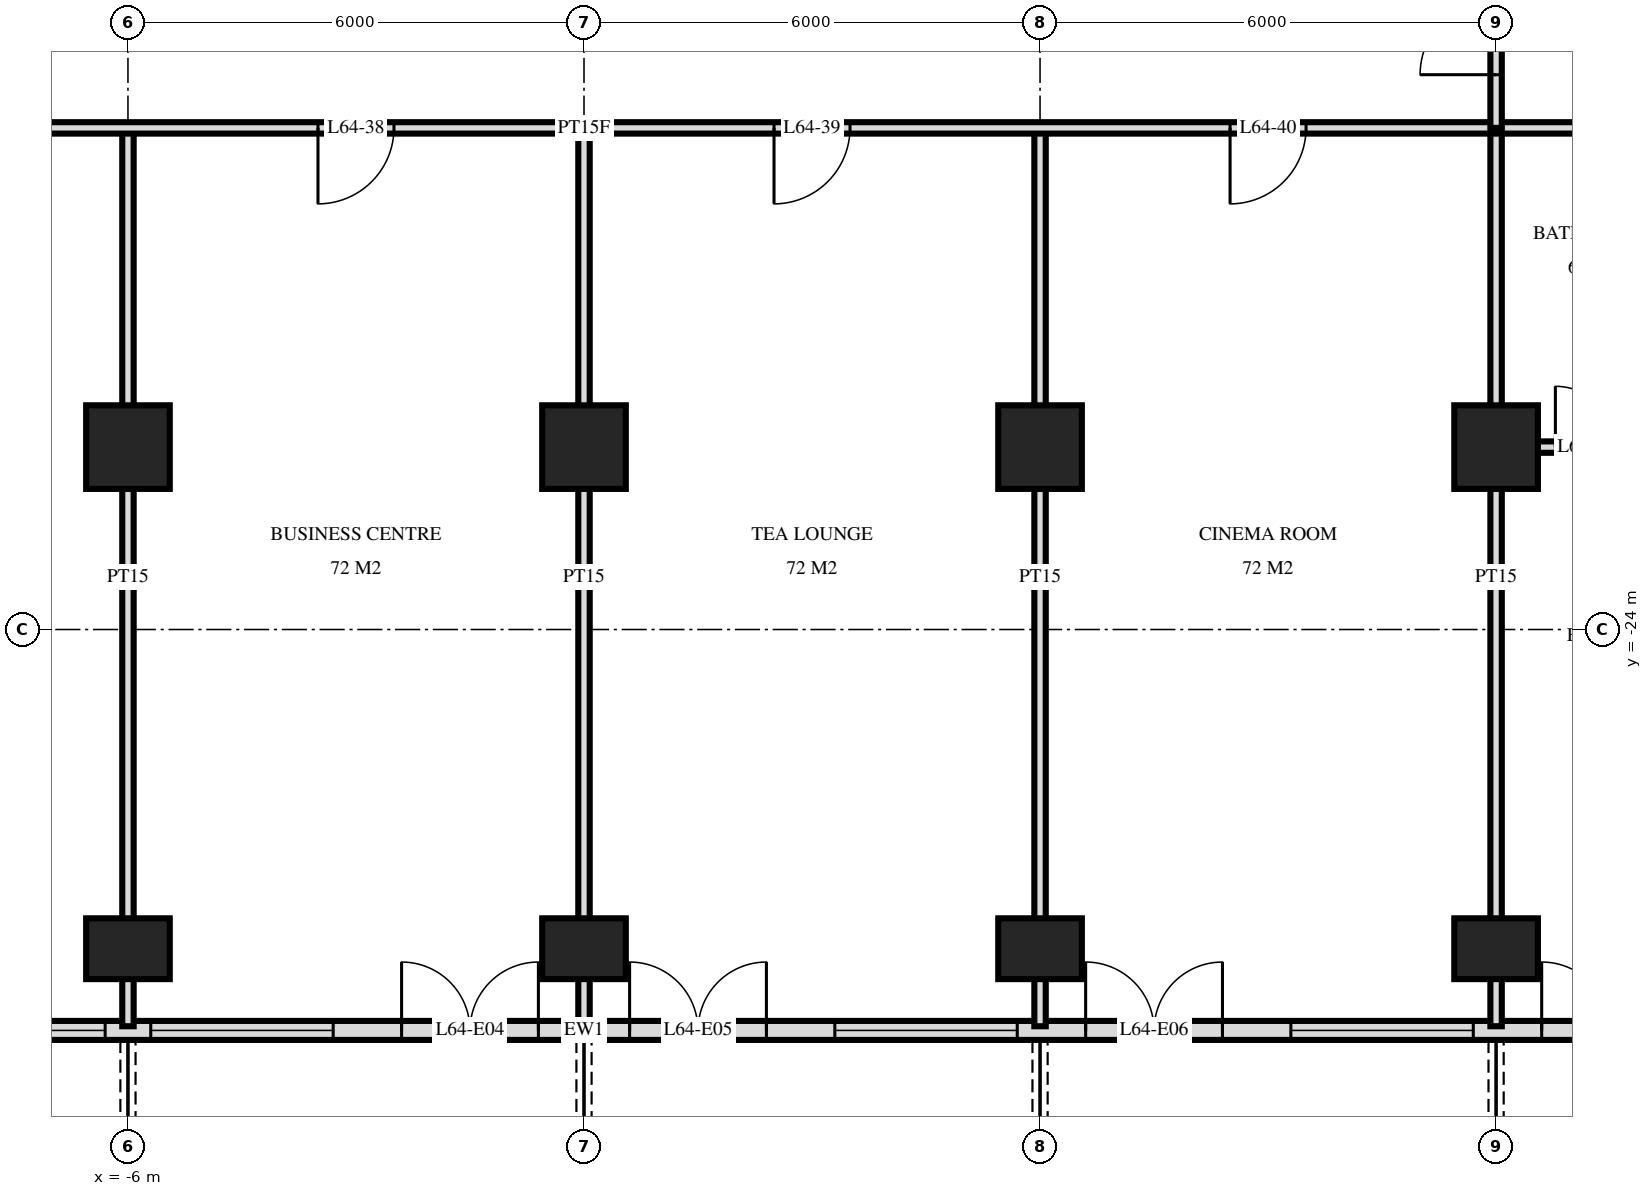
"""IFC4 building model, lengths in metres.
Left out: names, types, materials, properties, quantities, classifications, styles, units other than length and angle.
Written with IfcOpenShell. Run it as: python <this file> out.ifc"""

import sys

from ifc_helpers import new_model, si_unit, direction, frame, frame_2d, origin, origin_2d, place, context, subcontext, project, spatial, rectangle, extrude, element, fill, save


model = new_model("IFC4")
c1 = context("Model", 3, precision=1e-05, world=origin(), true_north=direction((0.0, 1.0)))
c2 = subcontext(c1, "Body", "Model", "MODEL_VIEW")
j1 = project(units=[si_unit("LENGTHUNIT", "METRE"), si_unit("PLANEANGLEUNIT", "RADIAN")], contexts=[c1])
p1 = place(None, origin())
s1 = spatial("IfcSite", under=j1, at=p1, CompositionType="ELEMENT")
p2 = place(p1, origin())
s2 = spatial("IfcBuilding", under=s1, at=p2, CompositionType="ELEMENT")
p3 = place(p2, frame((0.0, 0.0, 243.1)))
s3 = spatial("IfcBuildingStorey", under=s2, at=p3, CompositionType="ELEMENT", Elevation=243.1)
p4 = place(p3, frame((-6.0, -28.2, 0.0), z_axis=(0.0, 0.0, 1.0), x_axis=(1.0, 0.0, 0.0)))
e1 = element("IfcColumn", 1, at=p4, inside=s3, PredefinedType="COLUMN", context=c2, shape_type="SweptSolid", body=[
    extrude(rectangle(XDim=1.1, YDim=0.8, at=origin_2d()), origin(), (0.0, 0.0, 1.0), 3.5),
])
p5 = place(p3, frame((-6.0, -21.6, 0.0), z_axis=(0.0, 0.0, 1.0), x_axis=(1.0, 0.0, 0.0)))
e2 = element("IfcColumn", 2, at=p5, inside=s3, PredefinedType="COLUMN", context=c2, shape_type="SweptSolid", body=[
    extrude(rectangle(XDim=1.1, YDim=1.1, at=origin_2d()), origin(), (0.0, 0.0, 1.0), 3.5),
])
p6 = place(p3, frame((0.0, -28.2, 0.0), z_axis=(0.0, 0.0, 1.0), x_axis=(1.0, 0.0, 0.0)))
e3 = element("IfcColumn", 3, at=p6, inside=s3, PredefinedType="COLUMN", context=c2, shape_type="SweptSolid", body=[
    extrude(rectangle(XDim=1.1, YDim=0.8, at=origin_2d()), origin(), (0.0, 0.0, 1.0), 3.5),
])
p7 = place(p3, frame((0.0, -21.6, 0.0), z_axis=(0.0, 0.0, 1.0), x_axis=(1.0, 0.0, 0.0)))
e4 = element("IfcColumn", 4, at=p7, inside=s3, PredefinedType="COLUMN", context=c2, shape_type="SweptSolid", body=[
    extrude(rectangle(XDim=1.1, YDim=1.1, at=origin_2d()), origin(), (0.0, 0.0, 1.0), 3.5),
])
p8 = place(p3, frame((6.0, -28.2, 0.0), z_axis=(0.0, 0.0, 1.0), x_axis=(1.0, 0.0, 0.0)))
e5 = element("IfcColumn", 5, at=p8, inside=s3, PredefinedType="COLUMN", context=c2, shape_type="SweptSolid", body=[
    extrude(rectangle(XDim=1.1, YDim=0.8, at=origin_2d()), origin(), (0.0, 0.0, 1.0), 3.5),
])
p9 = place(p3, frame((6.0, -21.6, 0.0), z_axis=(0.0, 0.0, 1.0), x_axis=(1.0, 0.0, 0.0)))
e6 = element("IfcColumn", 6, at=p9, inside=s3, PredefinedType="COLUMN", context=c2, shape_type="SweptSolid", body=[
    extrude(rectangle(XDim=1.1, YDim=1.1, at=origin_2d()), origin(), (0.0, 0.0, 1.0), 3.5),
])
p10 = place(p3, frame((12.0, -28.2, 0.0), z_axis=(0.0, 0.0, 1.0), x_axis=(1.0, 0.0, 0.0)))
e7 = element("IfcColumn", 7, at=p10, inside=s3, PredefinedType="COLUMN", context=c2, shape_type="SweptSolid", body=[
    extrude(rectangle(XDim=1.1, YDim=0.8, at=origin_2d()), origin(), (0.0, 0.0, 1.0), 3.5),
])
p11 = place(p3, frame((12.0, -21.6, 0.0), z_axis=(0.0, 0.0, 1.0), x_axis=(1.0, 0.0, 0.0)))
e8 = element("IfcColumn", 8, at=p11, inside=s3, PredefinedType="COLUMN", context=c2, shape_type="SweptSolid", body=[
    extrude(rectangle(XDim=1.1, YDim=1.1, at=origin_2d()), origin(), (0.0, 0.0, 1.0), 3.5),
])
p12 = place(p3, frame((-22.475, -29.275, 0.0), z_axis=(0.0, 0.0, 1.0), x_axis=(1.0, 0.0, 0.0)))
e9 = element("IfcWall", 9, at=p12, inside=s3, PredefinedType="SOLIDWALL", context=c2, shape_type="SweptSolid", body=[
    extrude(rectangle(XDim=44.951, YDim=0.25, at=frame_2d((22.475, 0.0))), origin(), (0.0, 0.0, 1.0), 3.2),
])
p13 = place(p12, frame((0.575, 0.0, 0.0)))
e10 = element("IfcOpeningElement", 10, at=p13, cuts=e9, PredefinedType="OPENING", context=c2, shape_type="SweptSolid", body=[
    extrude(rectangle(XDim=1.8, YDim=2.4, at=frame_2d((0.9, 1.2))), frame((0.0, 0.135, 0.0), z_axis=(0.0, -1.0, 0.0), x_axis=(1.0, 0.0, 0.0)), (0.0, 0.0, 1.0), 0.27),
])
p14 = place(p12, frame((4.775, 0.0, 0.9)))
e11 = element("IfcOpeningElement", 11, at=p14, cuts=e9, PredefinedType="OPENING", context=c2, shape_type="SweptSolid", body=[
    extrude(rectangle(XDim=2.4, YDim=1.5, at=frame_2d((1.2, 0.75))), frame((0.0, 0.135, 0.0), z_axis=(0.0, -1.0, 0.0), x_axis=(1.0, 0.0, 0.0)), (0.0, 0.0, 1.0), 0.27),
])
p15 = place(p12, frame((8.075, 0.0, 0.0)))
e12 = element("IfcOpeningElement", 12, at=p15, cuts=e9, PredefinedType="OPENING", context=c2, shape_type="SweptSolid", body=[
    extrude(rectangle(XDim=1.8, YDim=2.4, at=frame_2d((0.9, 1.2))), frame((0.0, 0.135, 0.0), z_axis=(0.0, -1.0, 0.0), x_axis=(1.0, 0.0, 0.0)), (0.0, 0.0, 1.0), 0.27),
])
p16 = place(p12, frame((11.075, 0.0, 0.0)))
e13 = element("IfcOpeningElement", 13, at=p16, cuts=e9, PredefinedType="OPENING", context=c2, shape_type="SweptSolid", body=[
    extrude(rectangle(XDim=1.8, YDim=2.4, at=frame_2d((0.9, 1.2))), frame((0.0, 0.135, 0.0), z_axis=(0.0, -1.0, 0.0), x_axis=(1.0, 0.0, 0.0)), (0.0, 0.0, 1.0), 0.27),
])
p17 = place(p12, frame((13.775, 0.0, 0.9)))
e14 = element("IfcOpeningElement", 14, at=p17, cuts=e9, PredefinedType="OPENING", context=c2, shape_type="SweptSolid", body=[
    extrude(rectangle(XDim=2.4, YDim=1.5, at=frame_2d((1.2, 0.75))), frame((0.0, 0.135, 0.0), z_axis=(0.0, -1.0, 0.0), x_axis=(1.0, 0.0, 0.0)), (0.0, 0.0, 1.0), 0.27),
])
p18 = place(p12, frame((16.775, 0.0, 0.9)))
e15 = element("IfcOpeningElement", 15, at=p18, cuts=e9, PredefinedType="OPENING", context=c2, shape_type="SweptSolid", body=[
    extrude(rectangle(XDim=2.4, YDim=1.5, at=frame_2d((1.2, 0.75))), frame((0.0, 0.135, 0.0), z_axis=(0.0, -1.0, 0.0), x_axis=(1.0, 0.0, 0.0)), (0.0, 0.0, 1.0), 0.27),
])
p19 = place(p12, frame((20.075, 0.0, 0.0)))
e16 = element("IfcOpeningElement", 16, at=p19, cuts=e9, PredefinedType="OPENING", context=c2, shape_type="SweptSolid", body=[
    extrude(rectangle(XDim=1.8, YDim=2.4, at=frame_2d((0.9, 1.2))), frame((0.0, 0.135, 0.0), z_axis=(0.0, -1.0, 0.0), x_axis=(1.0, 0.0, 0.0)), (0.0, 0.0, 1.0), 0.27),
])
p20 = place(p12, frame((23.075, 0.0, 0.0)))
e17 = element("IfcOpeningElement", 17, at=p20, cuts=e9, PredefinedType="OPENING", context=c2, shape_type="SweptSolid", body=[
    extrude(rectangle(XDim=1.8, YDim=2.4, at=frame_2d((0.9, 1.2))), frame((0.0, 0.135, 0.0), z_axis=(0.0, -1.0, 0.0), x_axis=(1.0, 0.0, 0.0)), (0.0, 0.0, 1.0), 0.27),
])
p21 = place(p12, frame((25.775, 0.0, 0.9)))
e18 = element("IfcOpeningElement", 18, at=p21, cuts=e9, PredefinedType="OPENING", context=c2, shape_type="SweptSolid", body=[
    extrude(rectangle(XDim=2.4, YDim=1.5, at=frame_2d((1.2, 0.75))), frame((0.0, 0.135, 0.0), z_axis=(0.0, -1.0, 0.0), x_axis=(1.0, 0.0, 0.0)), (0.0, 0.0, 1.0), 0.27),
])
p22 = place(p12, frame((29.075, 0.0, 0.0)))
e19 = element("IfcOpeningElement", 19, at=p22, cuts=e9, PredefinedType="OPENING", context=c2, shape_type="SweptSolid", body=[
    extrude(rectangle(XDim=1.8, YDim=2.4, at=frame_2d((0.9, 1.2))), frame((0.0, 0.135, 0.0), z_axis=(0.0, -1.0, 0.0), x_axis=(1.0, 0.0, 0.0)), (0.0, 0.0, 1.0), 0.27),
])
p23 = place(p12, frame((31.775, 0.0, 0.9)))
e20 = element("IfcOpeningElement", 20, at=p23, cuts=e9, PredefinedType="OPENING", context=c2, shape_type="SweptSolid", body=[
    extrude(rectangle(XDim=2.4, YDim=1.5, at=frame_2d((1.2, 0.75))), frame((0.0, 0.135, 0.0), z_axis=(0.0, -1.0, 0.0), x_axis=(1.0, 0.0, 0.0)), (0.0, 0.0, 1.0), 0.27),
])
p24 = place(p12, frame((35.075, 0.0, 0.0)))
e21 = element("IfcOpeningElement", 21, at=p24, cuts=e9, PredefinedType="OPENING", context=c2, shape_type="SweptSolid", body=[
    extrude(rectangle(XDim=1.8, YDim=2.4, at=frame_2d((0.9, 1.2))), frame((0.0, 0.135, 0.0), z_axis=(0.0, -1.0, 0.0), x_axis=(1.0, 0.0, 0.0)), (0.0, 0.0, 1.0), 0.27),
])
p25 = place(p12, frame((41.075, 0.0, 0.0)))
e22 = element("IfcOpeningElement", 22, at=p25, cuts=e9, PredefinedType="OPENING", context=c2, shape_type="SweptSolid", body=[
    extrude(rectangle(XDim=1.8, YDim=2.4, at=frame_2d((0.9, 1.2))), frame((0.0, 0.135, 0.0), z_axis=(0.0, -1.0, 0.0), x_axis=(1.0, 0.0, 0.0)), (0.0, 0.0, 1.0), 0.27),
])
p26 = place(p3, frame((12.0, -17.4, 0.0), z_axis=(0.0, 0.0, 1.0), x_axis=(0.0, 1.0, 0.0)))
e23 = element("IfcWall", 23, at=p26, inside=s3, PredefinedType="PARTITIONING", context=c2, shape_type="SweptSolid", body=[
    extrude(rectangle(XDim=2.35, YDim=0.15, at=frame_2d((1.175, 0.0))), origin(), (0.0, 0.0, 1.0), 3.22),
])
p27 = place(p26, frame((0.7, 0.0, 0.0)))
e24 = element("IfcOpeningElement", 24, at=p27, cuts=e23, PredefinedType="OPENING", context=c2, shape_type="SweptSolid", body=[
    extrude(rectangle(XDim=1.0, YDim=2.1, at=frame_2d((0.5, 1.05))), frame((0.0, 0.085, 0.0), z_axis=(0.0, -1.0, 0.0), x_axis=(1.0, 0.0, 0.0)), (0.0, 0.0, 1.0), 0.17),
])
for number, where, z_axis, x_axis in (
    (25, (12.0, -29.22, 0.0), (0.0, 0.0, 1.0), (0.0, 1.0, 0.0)),
    (26, (6.0, -29.22, 0.0), (0.0, 0.0, 1.0), (0.0, 1.0, 0.0)),
    (27, (0.0, -29.22, 0.0), (0.0, 0.0, 1.0), (0.0, 1.0, 0.0)),
    (28, (-6.0, -29.22, 0.0), (0.0, 0.0, 1.0), (0.0, 1.0, 0.0)),
):
    element("IfcWall", number, at=place(p3, frame(where, z_axis=z_axis, x_axis=x_axis)), inside=s3, PredefinedType="PARTITIONING", context=c2, shape_type="SweptSolid", body=[
        extrude(rectangle(XDim=11.82, YDim=0.15, at=frame_2d((5.91, 0.0))), origin(), (0.0, 0.0, 1.0), 3.22),
    ])
p28 = place(p3, frame((12.0, -21.6, 0.0), z_axis=(0.0, 0.0, 1.0), x_axis=(1.0, 0.0, 0.0)))
e29 = element("IfcWall", 29, at=p28, inside=s3, PredefinedType="PARTITIONING", context=c2, shape_type="SweptSolid", body=[
    extrude(rectangle(XDim=8.4, YDim=0.15, at=frame_2d((4.2, 0.0))), origin(), (0.0, 0.0, 1.0), 3.22),
])
p29 = place(p28, frame((0.78, 0.0, 0.0)))
e30 = element("IfcOpeningElement", 30, at=p29, cuts=e29, PredefinedType="OPENING", context=c2, shape_type="SweptSolid", body=[
    extrude(rectangle(XDim=0.8, YDim=2.1, at=frame_2d((0.4, 1.05))), frame((0.0, 0.085, 0.0), z_axis=(0.0, -1.0, 0.0), x_axis=(1.0, 0.0, 0.0)), (0.0, 0.0, 1.0), 0.17),
])
p30 = place(p28, frame((2.98, 0.0, 0.0)))
e31 = element("IfcOpeningElement", 31, at=p30, cuts=e29, PredefinedType="OPENING", context=c2, shape_type="SweptSolid", body=[
    extrude(rectangle(XDim=0.9, YDim=2.1, at=frame_2d((0.45, 1.05))), frame((0.0, 0.085, 0.0), z_axis=(0.0, -1.0, 0.0), x_axis=(1.0, 0.0, 0.0)), (0.0, 0.0, 1.0), 0.17),
])
p31 = place(p3, frame((-26.82, -17.4, 0.0), z_axis=(0.0, 0.0, 1.0), x_axis=(1.0, 0.0, 0.0)))
e32 = element("IfcWall", 32, at=p31, inside=s3, PredefinedType="PARTITIONING", context=c2, shape_type="SweptSolid", body=[
    extrude(rectangle(XDim=53.64, YDim=0.15, at=frame_2d((26.82, 0.0))), origin(), (0.0, 0.0, 1.0), 3.22),
])
p32 = place(p31, frame((11.97, 0.0, 0.0)))
e33 = element("IfcOpeningElement", 33, at=p32, cuts=e32, PredefinedType="OPENING", context=c2, shape_type="SweptSolid", body=[
    extrude(rectangle(XDim=1.0, YDim=2.1, at=frame_2d((0.5, 1.05))), frame((0.0, 0.085, 0.0), z_axis=(0.0, -1.0, 0.0), x_axis=(1.0, 0.0, 0.0)), (0.0, 0.0, 1.0), 0.17),
])
p33 = place(p31, frame((3.92, 0.0, 0.0)))
e34 = element("IfcOpeningElement", 34, at=p33, cuts=e32, PredefinedType="OPENING", context=c2, shape_type="SweptSolid", body=[
    extrude(rectangle(XDim=1.0, YDim=2.1, at=frame_2d((0.5, 1.05))), frame((0.0, 0.085, 0.0), z_axis=(0.0, -1.0, 0.0), x_axis=(1.0, 0.0, 0.0)), (0.0, 0.0, 1.0), 0.17),
])
p34 = place(p31, frame((5.72, 0.0, 0.0)))
e35 = element("IfcOpeningElement", 35, at=p34, cuts=e32, PredefinedType="OPENING", context=c2, shape_type="SweptSolid", body=[
    extrude(rectangle(XDim=1.0, YDim=2.1, at=frame_2d((0.5, 1.05))), frame((0.0, 0.085, 0.0), z_axis=(0.0, -1.0, 0.0), x_axis=(1.0, 0.0, 0.0)), (0.0, 0.0, 1.0), 0.17),
])
p35 = place(p31, frame((47.72, 0.0, 0.0)))
e36 = element("IfcOpeningElement", 36, at=p35, cuts=e32, PredefinedType="OPENING", context=c2, shape_type="SweptSolid", body=[
    extrude(rectangle(XDim=1.0, YDim=2.1, at=frame_2d((0.5, 1.05))), frame((0.0, 0.085, 0.0), z_axis=(0.0, -1.0, 0.0), x_axis=(1.0, 0.0, 0.0)), (0.0, 0.0, 1.0), 0.17),
])
p36 = place(p31, frame((51.02, 0.0, 0.0)))
e37 = element("IfcOpeningElement", 37, at=p36, cuts=e32, PredefinedType="OPENING", context=c2, shape_type="SweptSolid", body=[
    extrude(rectangle(XDim=1.0, YDim=2.1, at=frame_2d((0.5, 1.05))), frame((0.0, 0.085, 0.0), z_axis=(0.0, -1.0, 0.0), x_axis=(1.0, 0.0, 0.0)), (0.0, 0.0, 1.0), 0.17),
])
p37 = place(p31, frame((17.32, 0.0, 0.0)))
e38 = element("IfcOpeningElement", 38, at=p37, cuts=e32, PredefinedType="OPENING", context=c2, shape_type="SweptSolid", body=[
    extrude(rectangle(XDim=1.0, YDim=2.1, at=frame_2d((0.5, 1.05))), frame((0.0, 0.085, 0.0), z_axis=(0.0, -1.0, 0.0), x_axis=(1.0, 0.0, 0.0)), (0.0, 0.0, 1.0), 0.17),
])
p38 = place(p31, frame((23.32, 0.0, 0.0)))
e39 = element("IfcOpeningElement", 39, at=p38, cuts=e32, PredefinedType="OPENING", context=c2, shape_type="SweptSolid", body=[
    extrude(rectangle(XDim=1.0, YDim=2.1, at=frame_2d((0.5, 1.05))), frame((0.0, 0.085, 0.0), z_axis=(0.0, -1.0, 0.0), x_axis=(1.0, 0.0, 0.0)), (0.0, 0.0, 1.0), 0.17),
])
p39 = place(p31, frame((29.32, 0.0, 0.0)))
e40 = element("IfcOpeningElement", 40, at=p39, cuts=e32, PredefinedType="OPENING", context=c2, shape_type="SweptSolid", body=[
    extrude(rectangle(XDim=1.0, YDim=2.1, at=frame_2d((0.5, 1.05))), frame((0.0, 0.085, 0.0), z_axis=(0.0, -1.0, 0.0), x_axis=(1.0, 0.0, 0.0)), (0.0, 0.0, 1.0), 0.17),
])
p40 = place(p31, frame((35.32, 0.0, 0.0)))
e41 = element("IfcOpeningElement", 41, at=p40, cuts=e32, PredefinedType="OPENING", context=c2, shape_type="SweptSolid", body=[
    extrude(rectangle(XDim=1.0, YDim=2.1, at=frame_2d((0.5, 1.05))), frame((0.0, 0.085, 0.0), z_axis=(0.0, -1.0, 0.0), x_axis=(1.0, 0.0, 0.0)), (0.0, 0.0, 1.0), 0.17),
])
p41 = place(p17, origin())
e42 = element("IfcWindow", 42, at=p41, inside=s3, PartitioningType="SINGLE_PANEL", PredefinedType="WINDOW", context=c2, shape_type="SweptSolid", body=[
    extrude(rectangle(XDim=2.4, YDim=1.5, at=frame_2d((1.2, 0.75))), frame((0.0, 0.03, 0.0), z_axis=(0.0, -1.0, 0.0), x_axis=(1.0, 0.0, 0.0)), (0.0, 0.0, 1.0), 0.06),
])
fill(e14, e42)
p42 = place(p18, origin())
e43 = element("IfcWindow", 43, at=p42, inside=s3, PartitioningType="SINGLE_PANEL", PredefinedType="WINDOW", context=c2, shape_type="SweptSolid", body=[
    extrude(rectangle(XDim=2.4, YDim=1.5, at=frame_2d((1.2, 0.75))), frame((0.0, 0.03, 0.0), z_axis=(0.0, -1.0, 0.0), x_axis=(1.0, 0.0, 0.0)), (0.0, 0.0, 1.0), 0.06),
])
fill(e15, e43)
p43 = place(p19, origin())
e44 = element("IfcDoor", 44, at=p43, inside=s3, OperationType="DOUBLE_DOOR_SINGLE_SWING", PredefinedType="DOOR", context=c2, shape_type="SweptSolid", body=[
    extrude(rectangle(XDim=1.8, YDim=2.4, at=frame_2d((0.9, 1.2))), frame((0.0, 0.025, 0.0), z_axis=(0.0, -1.0, 0.0), x_axis=(1.0, 0.0, 0.0)), (0.0, 0.0, 1.0), 0.05),
])
fill(e16, e44)
p44 = place(p20, origin())
e45 = element("IfcDoor", 45, at=p44, inside=s3, OperationType="DOUBLE_DOOR_SINGLE_SWING", PredefinedType="DOOR", context=c2, shape_type="SweptSolid", body=[
    extrude(rectangle(XDim=1.8, YDim=2.4, at=frame_2d((0.9, 1.2))), frame((0.0, 0.025, 0.0), z_axis=(0.0, -1.0, 0.0), x_axis=(1.0, 0.0, 0.0)), (0.0, 0.0, 1.0), 0.05),
])
fill(e17, e45)
p45 = place(p21, origin())
e46 = element("IfcWindow", 46, at=p45, inside=s3, PartitioningType="SINGLE_PANEL", PredefinedType="WINDOW", context=c2, shape_type="SweptSolid", body=[
    extrude(rectangle(XDim=2.4, YDim=1.5, at=frame_2d((1.2, 0.75))), frame((0.0, 0.03, 0.0), z_axis=(0.0, -1.0, 0.0), x_axis=(1.0, 0.0, 0.0)), (0.0, 0.0, 1.0), 0.06),
])
fill(e18, e46)
p46 = place(p22, origin())
e47 = element("IfcDoor", 47, at=p46, inside=s3, OperationType="DOUBLE_DOOR_SINGLE_SWING", PredefinedType="DOOR", context=c2, shape_type="SweptSolid", body=[
    extrude(rectangle(XDim=1.8, YDim=2.4, at=frame_2d((0.9, 1.2))), frame((0.0, 0.025, 0.0), z_axis=(0.0, -1.0, 0.0), x_axis=(1.0, 0.0, 0.0)), (0.0, 0.0, 1.0), 0.05),
])
fill(e19, e47)
p47 = place(p23, origin())
e48 = element("IfcWindow", 48, at=p47, inside=s3, PartitioningType="SINGLE_PANEL", PredefinedType="WINDOW", context=c2, shape_type="SweptSolid", body=[
    extrude(rectangle(XDim=2.4, YDim=1.5, at=frame_2d((1.2, 0.75))), frame((0.0, 0.03, 0.0), z_axis=(0.0, -1.0, 0.0), x_axis=(1.0, 0.0, 0.0)), (0.0, 0.0, 1.0), 0.06),
])
fill(e20, e48)
p48 = place(p24, origin())
e49 = element("IfcDoor", 49, at=p48, inside=s3, OperationType="DOUBLE_DOOR_SINGLE_SWING", PredefinedType="DOOR", context=c2, shape_type="SweptSolid", body=[
    extrude(rectangle(XDim=1.8, YDim=2.4, at=frame_2d((0.9, 1.2))), frame((0.0, 0.025, 0.0), z_axis=(0.0, -1.0, 0.0), x_axis=(1.0, 0.0, 0.0)), (0.0, 0.0, 1.0), 0.05),
])
fill(e21, e49)
p49 = place(p27, origin())
e50 = element("IfcDoor", 50, at=p49, inside=s3, OperationType="SINGLE_SWING_RIGHT", PredefinedType="DOOR", context=c2, shape_type="SweptSolid", body=[
    extrude(rectangle(XDim=1.0, YDim=2.1, at=frame_2d((0.5, 1.05))), frame((0.0, 0.025, 0.0), z_axis=(0.0, -1.0, 0.0), x_axis=(1.0, 0.0, 0.0)), (0.0, 0.0, 1.0), 0.05),
])
fill(e24, e50)
p50 = place(p38, frame((0.5, 0.0, 0.0), z_axis=(0.0, 0.0, 1.0), x_axis=(-1.0, 0.0, 0.0)))
e51 = element("IfcDoor", 51, at=p50, inside=s3, OperationType="SINGLE_SWING_LEFT", PredefinedType="DOOR", context=c2, shape_type="SweptSolid", body=[
    extrude(rectangle(XDim=1.0, YDim=2.1, at=frame_2d((0.0, 1.05))), frame((0.0, -0.025, 0.0), z_axis=(0.0, 1.0, 0.0), x_axis=(-1.0, 0.0, 0.0)), (0.0, 0.0, 1.0), 0.05),
])
fill(e39, e51)
p51 = place(p39, frame((0.5, 0.0, 0.0), z_axis=(0.0, 0.0, 1.0), x_axis=(-1.0, 0.0, 0.0)))
e52 = element("IfcDoor", 52, at=p51, inside=s3, OperationType="SINGLE_SWING_LEFT", PredefinedType="DOOR", context=c2, shape_type="SweptSolid", body=[
    extrude(rectangle(XDim=1.0, YDim=2.1, at=frame_2d((0.0, 1.05))), frame((0.0, -0.025, 0.0), z_axis=(0.0, 1.0, 0.0), x_axis=(-1.0, 0.0, 0.0)), (0.0, 0.0, 1.0), 0.05),
])
fill(e40, e52)
p52 = place(p40, frame((0.5, 0.0, 0.0), z_axis=(0.0, 0.0, 1.0), x_axis=(-1.0, 0.0, 0.0)))
e53 = element("IfcDoor", 53, at=p52, inside=s3, OperationType="SINGLE_SWING_LEFT", PredefinedType="DOOR", context=c2, shape_type="SweptSolid", body=[
    extrude(rectangle(XDim=1.0, YDim=2.1, at=frame_2d((0.0, 1.05))), frame((0.0, -0.025, 0.0), z_axis=(0.0, 1.0, 0.0), x_axis=(-1.0, 0.0, 0.0)), (0.0, 0.0, 1.0), 0.05),
])
fill(e41, e53)
p53 = place(p29, origin())
e54 = element("IfcDoor", 54, at=p53, inside=s3, OperationType="SINGLE_SWING_RIGHT", PredefinedType="DOOR", context=c2, shape_type="SweptSolid", body=[
    extrude(rectangle(XDim=0.8, YDim=2.1, at=frame_2d((0.4, 1.05))), frame((0.0, 0.025, 0.0), z_axis=(0.0, -1.0, 0.0), x_axis=(1.0, 0.0, 0.0)), (0.0, 0.0, 1.0), 0.05),
])
fill(e30, e54)
save(model, sys.argv[1])
